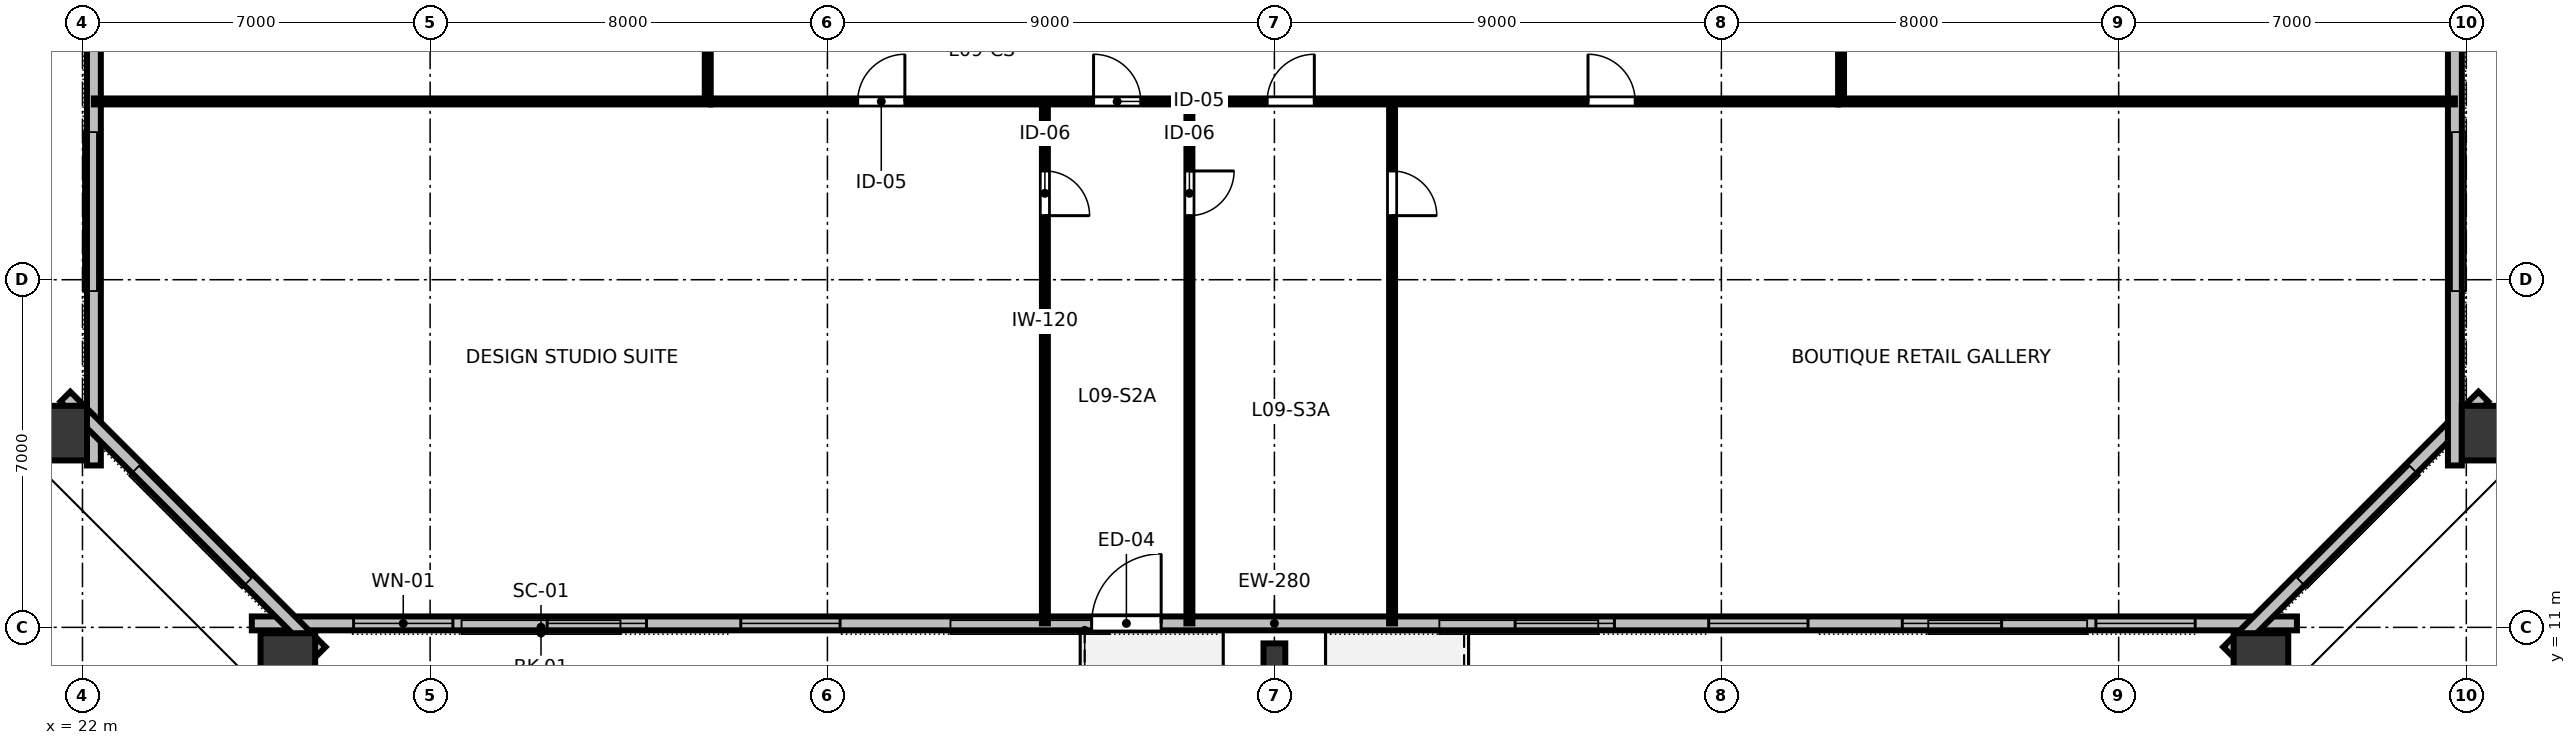
"""IFC4 building model, lengths in metres.
Left out: names, types, materials, properties, quantities, classifications, styles, units other than length and angle.
Written with IfcOpenShell. Run it as: python <this file> out.ifc"""

import sys

from ifc_helpers import new_model, si_unit, direction, frame, frame_2d, origin, origin_2d, place, context, subcontext, project, spatial, rectangle, hollow_rectangle, i_section, extrude, element, fill, save


model = new_model("IFC4")
c1 = context("Model", 3, precision=1e-05, world=origin(), true_north=direction((0.0, 1.0)))
c2 = subcontext(c1, "Body", "Model", "MODEL_VIEW")
j1 = project(units=[si_unit("LENGTHUNIT", "METRE"), si_unit("PLANEANGLEUNIT", "RADIAN")], contexts=[c1])
p1 = place(None, origin())
s1 = spatial("IfcSite", under=j1, at=p1, CompositionType="ELEMENT")
p2 = place(p1, origin())
s2 = spatial("IfcBuilding", under=s1, at=p2, CompositionType="ELEMENT")
p3 = place(p2, frame((0.0, 0.0, 38.8)))
s3 = spatial("IfcBuildingStorey", under=s2, at=p3, CompositionType="ELEMENT", Elevation=38.8)
p4 = place(p3, frame((26.135, 10.232, 0.0), z_axis=(0.0, 0.0, 1.0), x_axis=(1.0, 0.0, 0.0)))
e1 = element("IfcColumn", 1, at=p4, inside=s3, PredefinedType="COLUMN", context=c2, shape_type="SweptSolid", body=[
    extrude(hollow_rectangle(XDim=1.1, YDim=1.3, WallThickness=0.07, at=origin_2d()), origin(), (0.0, 0.0, 1.0), 3.358),
])
p5 = place(p3, frame((46.0, 10.42, 0.0), z_axis=(0.0, 0.0, 1.0), x_axis=(1.0, 0.0, 0.0)))
e2 = element("IfcColumn", 2, at=p5, inside=s3, PredefinedType="COLUMN", context=c2, shape_type="SweptSolid", body=[
    extrude(i_section(OverallWidth=0.439, OverallDepth=0.514, WebThickness=0.06, FlangeThickness=0.097, FilletRadius=0.025, at=origin_2d()), origin(), (0.0, 0.0, 1.0), 3.358),
])
for number, where, z_axis, x_axis in (
    (3, (65.865, 10.232, 0.0), (0.0, 0.0, 1.0), (1.0, 0.0, 0.0)),
    (4, (70.559, 14.911, 0.0), (0.0, 0.0, 1.0), (0.0, 1.0, 0.0)),
    (5, (21.441, 14.911, 0.0), (0.0, 0.0, 1.0), (0.0, 1.0, 0.0)),
):
    element("IfcColumn", number, at=place(p3, frame(where, z_axis=z_axis, x_axis=x_axis)), inside=s3, PredefinedType="COLUMN", context=c2, shape_type="SweptSolid", body=[
        extrude(hollow_rectangle(XDim=1.1, YDim=1.3, WallThickness=0.07, at=origin_2d()), origin(), (0.0, 0.0, 1.0), 3.358),
    ])
p6 = place(p3, frame((25.41, 11.08, 0.0), z_axis=(0.0, 0.0, 1.0), x_axis=(1.0, 0.0, 0.0)))
e6 = element("IfcWall", 6, at=p6, inside=s3, PredefinedType="STANDARD", context=c2, shape_type="SweptSolid", body=[
    extrude(rectangle(XDim=41.18, YDim=0.28, at=frame_2d((20.59, 0.0))), origin(), (0.0, 0.0, 1.0), 3.36),
])
p7 = place(p6, frame((16.91, 0.0, 0.0)))
e7 = element("IfcOpeningElement", 7, at=p7, cuts=e6, PredefinedType="OPENING", context=c2, shape_type="SweptSolid", body=[
    extrude(rectangle(XDim=1.4, YDim=2.15, at=frame_2d((0.7, 1.075))), frame((0.0, 0.15, 0.0), z_axis=(0.0, -1.0, 0.0), x_axis=(1.0, 0.0, 0.0)), (0.0, 0.0, 1.0), 0.3),
])
p8 = place(p6, frame((2.049, 0.0, 0.8)))
e8 = element("IfcOpeningElement", 8, at=p8, cuts=e6, PredefinedType="OPENING", context=c2, shape_type="SweptSolid", body=[
    extrude(rectangle(XDim=2.0, YDim=1.95, at=frame_2d((1.0, 0.975))), frame((0.0, 0.15, 0.0), z_axis=(0.0, -1.0, 0.0), x_axis=(1.0, 0.0, 0.0)), (0.0, 0.0, 1.0), 0.3),
])
p9 = place(p6, frame((5.947, 0.0, 0.8)))
e9 = element("IfcOpeningElement", 9, at=p9, cuts=e6, PredefinedType="OPENING", context=c2, shape_type="SweptSolid", body=[
    extrude(rectangle(XDim=2.0, YDim=1.95, at=frame_2d((1.0, 0.975))), frame((0.0, 0.15, 0.0), z_axis=(0.0, -1.0, 0.0), x_axis=(1.0, 0.0, 0.0)), (0.0, 0.0, 1.0), 0.3),
])
p10 = place(p6, frame((9.845, 0.0, 0.8)))
e10 = element("IfcOpeningElement", 10, at=p10, cuts=e6, PredefinedType="OPENING", context=c2, shape_type="SweptSolid", body=[
    extrude(rectangle(XDim=2.0, YDim=1.95, at=frame_2d((1.0, 0.975))), frame((0.0, 0.15, 0.0), z_axis=(0.0, -1.0, 0.0), x_axis=(1.0, 0.0, 0.0)), (0.0, 0.0, 1.0), 0.3),
])
p11 = place(p6, frame((25.437, 0.0, 0.8)))
e11 = element("IfcOpeningElement", 11, at=p11, cuts=e6, PredefinedType="OPENING", context=c2, shape_type="SweptSolid", body=[
    extrude(rectangle(XDim=2.0, YDim=1.95, at=frame_2d((1.0, 0.975))), frame((0.0, 0.15, 0.0), z_axis=(0.0, -1.0, 0.0), x_axis=(1.0, 0.0, 0.0)), (0.0, 0.0, 1.0), 0.3),
])
p12 = place(p6, frame((29.335, 0.0, 0.8)))
e12 = element("IfcOpeningElement", 12, at=p12, cuts=e6, PredefinedType="OPENING", context=c2, shape_type="SweptSolid", body=[
    extrude(rectangle(XDim=2.0, YDim=1.95, at=frame_2d((1.0, 0.975))), frame((0.0, 0.15, 0.0), z_axis=(0.0, -1.0, 0.0), x_axis=(1.0, 0.0, 0.0)), (0.0, 0.0, 1.0), 0.3),
])
p13 = place(p6, frame((33.233, 0.0, 0.8)))
e13 = element("IfcOpeningElement", 13, at=p13, cuts=e6, PredefinedType="OPENING", context=c2, shape_type="SweptSolid", body=[
    extrude(rectangle(XDim=2.0, YDim=1.95, at=frame_2d((1.0, 0.975))), frame((0.0, 0.15, 0.0), z_axis=(0.0, -1.0, 0.0), x_axis=(1.0, 0.0, 0.0)), (0.0, 0.0, 1.0), 0.3),
])
p14 = place(p6, frame((37.131, 0.0, 0.8)))
e14 = element("IfcOpeningElement", 14, at=p14, cuts=e6, PredefinedType="OPENING", context=c2, shape_type="SweptSolid", body=[
    extrude(rectangle(XDim=2.0, YDim=1.95, at=frame_2d((1.0, 0.975))), frame((0.0, 0.15, 0.0), z_axis=(0.0, -1.0, 0.0), x_axis=(1.0, 0.0, 0.0)), (0.0, 0.0, 1.0), 0.3),
])
p15 = place(p3, frame((65.205, 10.506, 0.0), z_axis=(0.0, 0.0, 1.0), x_axis=(0.707106781187, 0.707106781187, 0.0)))
e15 = element("IfcWall", 15, at=p15, inside=s3, PredefinedType="STANDARD", context=c2, shape_type="SweptSolid", body=[
    extrude(rectangle(XDim=7.268, YDim=0.28, at=frame_2d((3.634, 0.0))), origin(), (0.0, 0.0, 1.0), 3.36),
])
for number, where, z_axis, x_axis in (
    (16, (69.77, 14.26, 0.0), (0.0, 0.0, 1.0), (0.0, 1.0, 0.0)),
    (17, (22.23, 49.74, 0.0), (0.0, 0.0, 1.0), (0.0, -1.0, 0.0)),
):
    element("IfcWall", number, at=place(p3, frame(where, z_axis=z_axis, x_axis=x_axis)), inside=s3, PredefinedType="STANDARD", context=c2, shape_type="SweptSolid", body=[
        extrude(rectangle(XDim=35.48, YDim=0.28, at=frame_2d((17.74, 0.0))), origin(), (0.0, 0.0, 1.0), 3.36),
    ])
p16 = place(p3, frame((21.656, 15.646, 0.0), z_axis=(0.0, 0.0, 1.0), x_axis=(0.707106781187, -0.707106781187, 0.0)))
e18 = element("IfcWall", 18, at=p16, inside=s3, PredefinedType="STANDARD", context=c2, shape_type="SweptSolid", body=[
    extrude(rectangle(XDim=7.268, YDim=0.28, at=frame_2d((3.634, 0.0))), origin(), (0.0, 0.0, 1.0), 3.36),
])
p17 = place(p3, frame((41.379, 21.59, 0.0), z_axis=(0.0, 0.0, 1.0), x_axis=(0.0, -1.0, 0.0)))
e19 = element("IfcWall", 19, at=p17, inside=s3, PredefinedType="PARTITIONING", context=c2, shape_type="SweptSolid", body=[
    extrude(rectangle(XDim=10.51, YDim=0.12, at=frame_2d((5.255, 0.0))), origin(), (0.0, 0.0, 1.0), 2.64),
])
p18 = place(p17, frame((1.4, 0.0, 0.0)))
e20 = element("IfcOpeningElement", 20, at=p18, cuts=e19, PredefinedType="OPENING", context=c2, shape_type="SweptSolid", body=[
    extrude(rectangle(XDim=0.9, YDim=2.15, at=frame_2d((0.45, 1.075))), frame((0.0, 0.07, 0.0), z_axis=(0.0, -1.0, 0.0), x_axis=(1.0, 0.0, 0.0)), (0.0, 0.0, 1.0), 0.14),
])
p19 = place(p3, frame((44.289, 21.59, 0.0), z_axis=(0.0, 0.0, 1.0), x_axis=(0.0, -1.0, 0.0)))
e21 = element("IfcWall", 21, at=p19, inside=s3, PredefinedType="PARTITIONING", context=c2, shape_type="SweptSolid", body=[
    extrude(rectangle(XDim=10.51, YDim=0.12, at=frame_2d((5.255, 0.0))), origin(), (0.0, 0.0, 1.0), 2.64),
])
p20 = place(p19, frame((1.4, 0.0, 0.0)))
e22 = element("IfcOpeningElement", 22, at=p20, cuts=e21, PredefinedType="OPENING", context=c2, shape_type="SweptSolid", body=[
    extrude(rectangle(XDim=0.9, YDim=2.15, at=frame_2d((0.45, 1.075))), frame((0.0, 0.07, 0.0), z_axis=(0.0, -1.0, 0.0), x_axis=(1.0, 0.0, 0.0)), (0.0, 0.0, 1.0), 0.14),
])
p21 = place(p3, frame((48.37, 21.59, 0.0), z_axis=(0.0, 0.0, 1.0), x_axis=(0.0, -1.0, 0.0)))
e23 = element("IfcWall", 23, at=p21, inside=s3, PredefinedType="PARTITIONING", context=c2, shape_type="SweptSolid", body=[
    extrude(rectangle(XDim=10.51, YDim=0.12, at=frame_2d((5.255, 0.0))), origin(), (0.0, 0.0, 1.0), 2.64),
])
p22 = place(p21, frame((1.4, 0.0, 0.0)))
e24 = element("IfcOpeningElement", 24, at=p22, cuts=e23, PredefinedType="OPENING", context=c2, shape_type="SweptSolid", body=[
    extrude(rectangle(XDim=0.9, YDim=2.15, at=frame_2d((0.45, 1.075))), frame((0.0, 0.07, 0.0), z_axis=(0.0, -1.0, 0.0), x_axis=(1.0, 0.0, 0.0)), (0.0, 0.0, 1.0), 0.14),
])
p23 = place(p3, frame((34.65, 21.59, 0.0), z_axis=(0.0, 0.0, 1.0), x_axis=(1.0, 0.0, 0.0)))
e25 = element("IfcWall", 25, at=p23, inside=s3, PredefinedType="PARTITIONING", context=c2, shape_type="SweptSolid", body=[
    extrude(rectangle(XDim=22.7, YDim=0.12, at=frame_2d((11.35, 0.0))), origin(), (0.0, 0.0, 1.0), 2.64),
])
p24 = place(p23, frame((2.959, 0.0, 0.0)))
e26 = element("IfcOpeningElement", 26, at=p24, cuts=e25, PredefinedType="OPENING", context=c2, shape_type="SweptSolid", body=[
    extrude(rectangle(XDim=0.95, YDim=2.15, at=frame_2d((0.475, 1.075))), frame((0.0, 0.07, 0.0), z_axis=(0.0, -1.0, 0.0), x_axis=(1.0, 0.0, 0.0)), (0.0, 0.0, 1.0), 0.14),
])
p25 = place(p23, frame((7.709, 0.0, 0.0)))
e27 = element("IfcOpeningElement", 27, at=p25, cuts=e25, PredefinedType="OPENING", context=c2, shape_type="SweptSolid", body=[
    extrude(rectangle(XDim=0.95, YDim=2.15, at=frame_2d((0.475, 1.075))), frame((0.0, 0.07, 0.0), z_axis=(0.0, -1.0, 0.0), x_axis=(1.0, 0.0, 0.0)), (0.0, 0.0, 1.0), 0.14),
])
p26 = place(p23, frame((11.204, 0.0, 0.0)))
e28 = element("IfcOpeningElement", 28, at=p26, cuts=e25, PredefinedType="OPENING", context=c2, shape_type="SweptSolid", body=[
    extrude(rectangle(XDim=0.95, YDim=2.15, at=frame_2d((0.475, 1.075))), frame((0.0, 0.07, 0.0), z_axis=(0.0, -1.0, 0.0), x_axis=(1.0, 0.0, 0.0)), (0.0, 0.0, 1.0), 0.14),
])
p27 = place(p23, frame((17.665, 0.0, 0.0)))
e29 = element("IfcOpeningElement", 29, at=p27, cuts=e25, PredefinedType="OPENING", context=c2, shape_type="SweptSolid", body=[
    extrude(rectangle(XDim=0.95, YDim=2.15, at=frame_2d((0.475, 1.075))), frame((0.0, 0.07, 0.0), z_axis=(0.0, -1.0, 0.0), x_axis=(1.0, 0.0, 0.0)), (0.0, 0.0, 1.0), 0.14),
])
p28 = place(p3, frame((34.59, 21.65, 0.0), z_axis=(0.0, 0.0, 1.0), x_axis=(0.0, 1.0, 0.0)))
e30 = element("IfcWall", 30, at=p28, inside=s3, PredefinedType="PARTITIONING", context=c2, shape_type="SweptSolid", body=[
    extrude(rectangle(XDim=20.7, YDim=0.12, at=frame_2d((10.35, 0.0))), origin(), (0.0, 0.0, 1.0), 2.64),
])
p29 = place(p28, frame((3.402, 0.0, 0.0)))
e31 = element("IfcOpeningElement", 31, at=p29, cuts=e30, PredefinedType="OPENING", context=c2, shape_type="SweptSolid", body=[
    extrude(rectangle(XDim=0.95, YDim=2.15, at=frame_2d((0.475, 1.075))), frame((0.0, 0.07, 0.0), z_axis=(0.0, -1.0, 0.0), x_axis=(1.0, 0.0, 0.0)), (0.0, 0.0, 1.0), 0.14),
])
p30 = place(p28, frame((9.912, 0.0, 0.0)))
e32 = element("IfcOpeningElement", 32, at=p30, cuts=e30, PredefinedType="OPENING", context=c2, shape_type="SweptSolid", body=[
    extrude(rectangle(XDim=0.95, YDim=2.15, at=frame_2d((0.475, 1.075))), frame((0.0, 0.07, 0.0), z_axis=(0.0, -1.0, 0.0), x_axis=(1.0, 0.0, 0.0)), (0.0, 0.0, 1.0), 0.14),
])
p31 = place(p28, frame((16.385, 0.0, 0.0)))
e33 = element("IfcOpeningElement", 33, at=p31, cuts=e30, PredefinedType="OPENING", context=c2, shape_type="SweptSolid", body=[
    extrude(rectangle(XDim=0.95, YDim=2.15, at=frame_2d((0.475, 1.075))), frame((0.0, 0.07, 0.0), z_axis=(0.0, -1.0, 0.0), x_axis=(1.0, 0.0, 0.0)), (0.0, 0.0, 1.0), 0.14),
])
p32 = place(p3, frame((57.41, 21.65, 0.0), z_axis=(0.0, 0.0, 1.0), x_axis=(0.0, 1.0, 0.0)))
e34 = element("IfcWall", 34, at=p32, inside=s3, PredefinedType="PARTITIONING", context=c2, shape_type="SweptSolid", body=[
    extrude(rectangle(XDim=20.7, YDim=0.12, at=frame_2d((10.35, 0.0))), origin(), (0.0, 0.0, 1.0), 2.64),
])
p33 = place(p32, frame((9.875, 0.0, 0.0)))
e35 = element("IfcOpeningElement", 35, at=p33, cuts=e34, PredefinedType="OPENING", context=c2, shape_type="SweptSolid", body=[
    extrude(rectangle(XDim=0.95, YDim=2.15, at=frame_2d((0.475, 1.075))), frame((0.0, 0.07, 0.0), z_axis=(0.0, -1.0, 0.0), x_axis=(1.0, 0.0, 0.0)), (0.0, 0.0, 1.0), 0.14),
])
for number, where, z_axis, x_axis in (
    (36, (34.65, 21.59, 0.0), (0.0, 0.0, 1.0), (-1.0, 0.0, 0.0)),
    (37, (57.35, 21.59, 0.0), (0.0, 0.0, 1.0), (1.0, 0.0, 0.0)),
):
    element("IfcWall", number, at=place(p3, frame(where, z_axis=z_axis, x_axis=x_axis)), inside=s3, PredefinedType="PARTITIONING", context=c2, shape_type="SweptSolid", body=[
        extrude(rectangle(XDim=12.42, YDim=0.12, at=frame_2d((6.21, 0.0))), origin(), (0.0, 0.0, 1.0), 2.64),
    ])
p34 = place(p7, origin())
e38 = element("IfcDoor", 38, at=p34, inside=s3, OperationType="SINGLE_SWING_RIGHT", PredefinedType="DOOR", context=c2, shape_type="SweptSolid", body=[
    extrude(rectangle(XDim=1.4, YDim=2.15, at=frame_2d((0.7, 1.075))), frame((0.0, 0.025, 0.0), z_axis=(0.0, -1.0, 0.0), x_axis=(1.0, 0.0, 0.0)), (0.0, 0.0, 1.0), 0.05),
])
fill(e7, e38)
p35 = place(p8, origin())
e39 = element("IfcWindow", 39, at=p35, inside=s3, PartitioningType="SINGLE_PANEL", PredefinedType="WINDOW", context=c2, shape_type="SweptSolid", body=[
    extrude(rectangle(XDim=2.0, YDim=1.95, at=frame_2d((1.0, 0.975))), frame((0.0, 0.03, 0.0), z_axis=(0.0, -1.0, 0.0), x_axis=(1.0, 0.0, 0.0)), (0.0, 0.0, 1.0), 0.06),
])
fill(e8, e39)
p36 = place(p9, origin())
e40 = element("IfcWindow", 40, at=p36, inside=s3, PartitioningType="SINGLE_PANEL", PredefinedType="WINDOW", context=c2, shape_type="SweptSolid", body=[
    extrude(rectangle(XDim=2.0, YDim=1.95, at=frame_2d((1.0, 0.975))), frame((0.0, 0.03, 0.0), z_axis=(0.0, -1.0, 0.0), x_axis=(1.0, 0.0, 0.0)), (0.0, 0.0, 1.0), 0.06),
])
fill(e9, e40)
p37 = place(p10, origin())
e41 = element("IfcWindow", 41, at=p37, inside=s3, PartitioningType="SINGLE_PANEL", PredefinedType="WINDOW", context=c2, shape_type="SweptSolid", body=[
    extrude(rectangle(XDim=2.0, YDim=1.95, at=frame_2d((1.0, 0.975))), frame((0.0, 0.03, 0.0), z_axis=(0.0, -1.0, 0.0), x_axis=(1.0, 0.0, 0.0)), (0.0, 0.0, 1.0), 0.06),
])
fill(e10, e41)
p38 = place(p11, origin())
e42 = element("IfcWindow", 42, at=p38, inside=s3, PartitioningType="SINGLE_PANEL", PredefinedType="WINDOW", context=c2, shape_type="SweptSolid", body=[
    extrude(rectangle(XDim=2.0, YDim=1.95, at=frame_2d((1.0, 0.975))), frame((0.0, 0.03, 0.0), z_axis=(0.0, -1.0, 0.0), x_axis=(1.0, 0.0, 0.0)), (0.0, 0.0, 1.0), 0.06),
])
fill(e11, e42)
p39 = place(p12, origin())
e43 = element("IfcWindow", 43, at=p39, inside=s3, PartitioningType="SINGLE_PANEL", PredefinedType="WINDOW", context=c2, shape_type="SweptSolid", body=[
    extrude(rectangle(XDim=2.0, YDim=1.95, at=frame_2d((1.0, 0.975))), frame((0.0, 0.03, 0.0), z_axis=(0.0, -1.0, 0.0), x_axis=(1.0, 0.0, 0.0)), (0.0, 0.0, 1.0), 0.06),
])
fill(e12, e43)
p40 = place(p13, origin())
e44 = element("IfcWindow", 44, at=p40, inside=s3, PartitioningType="SINGLE_PANEL", PredefinedType="WINDOW", context=c2, shape_type="SweptSolid", body=[
    extrude(rectangle(XDim=2.0, YDim=1.95, at=frame_2d((1.0, 0.975))), frame((0.0, 0.03, 0.0), z_axis=(0.0, -1.0, 0.0), x_axis=(1.0, 0.0, 0.0)), (0.0, 0.0, 1.0), 0.06),
])
fill(e13, e44)
p41 = place(p14, origin())
e45 = element("IfcWindow", 45, at=p41, inside=s3, PartitioningType="SINGLE_PANEL", PredefinedType="WINDOW", context=c2, shape_type="SweptSolid", body=[
    extrude(rectangle(XDim=2.0, YDim=1.95, at=frame_2d((1.0, 0.975))), frame((0.0, 0.03, 0.0), z_axis=(0.0, -1.0, 0.0), x_axis=(1.0, 0.0, 0.0)), (0.0, 0.0, 1.0), 0.06),
])
fill(e14, e45)
p42 = place(p18, origin())
e46 = element("IfcDoor", 46, at=p42, inside=s3, OperationType="SINGLE_SWING_RIGHT", PredefinedType="DOOR", context=c2, shape_type="SweptSolid", body=[
    extrude(rectangle(XDim=0.9, YDim=2.15, at=frame_2d((0.45, 1.075))), frame((0.0, 0.025, 0.0), z_axis=(0.0, -1.0, 0.0), x_axis=(1.0, 0.0, 0.0)), (0.0, 0.0, 1.0), 0.05),
])
fill(e20, e46)
p43 = place(p20, origin())
e47 = element("IfcDoor", 47, at=p43, inside=s3, OperationType="SINGLE_SWING_LEFT", PredefinedType="DOOR", context=c2, shape_type="SweptSolid", body=[
    extrude(rectangle(XDim=0.9, YDim=2.15, at=frame_2d((0.45, 1.075))), frame((0.0, 0.025, 0.0), z_axis=(0.0, -1.0, 0.0), x_axis=(1.0, 0.0, 0.0)), (0.0, 0.0, 1.0), 0.05),
])
fill(e22, e47)
p44 = place(p22, origin())
e48 = element("IfcDoor", 48, at=p44, inside=s3, OperationType="SINGLE_SWING_RIGHT", PredefinedType="DOOR", context=c2, shape_type="SweptSolid", body=[
    extrude(rectangle(XDim=0.9, YDim=2.15, at=frame_2d((0.45, 1.075))), frame((0.0, 0.025, 0.0), z_axis=(0.0, -1.0, 0.0), x_axis=(1.0, 0.0, 0.0)), (0.0, 0.0, 1.0), 0.05),
])
fill(e24, e48)
p45 = place(p24, origin())
e49 = element("IfcDoor", 49, at=p45, inside=s3, OperationType="SINGLE_SWING_RIGHT", PredefinedType="DOOR", context=c2, shape_type="SweptSolid", body=[
    extrude(rectangle(XDim=0.95, YDim=2.15, at=frame_2d((0.475, 1.075))), frame((0.0, 0.025, 0.0), z_axis=(0.0, -1.0, 0.0), x_axis=(1.0, 0.0, 0.0)), (0.0, 0.0, 1.0), 0.05),
])
fill(e26, e49)
p46 = place(p25, origin())
e50 = element("IfcDoor", 50, at=p46, inside=s3, OperationType="SINGLE_SWING_LEFT", PredefinedType="DOOR", context=c2, shape_type="SweptSolid", body=[
    extrude(rectangle(XDim=0.95, YDim=2.15, at=frame_2d((0.475, 1.075))), frame((0.0, 0.025, 0.0), z_axis=(0.0, -1.0, 0.0), x_axis=(1.0, 0.0, 0.0)), (0.0, 0.0, 1.0), 0.05),
])
fill(e27, e50)
p47 = place(p26, origin())
e51 = element("IfcDoor", 51, at=p47, inside=s3, OperationType="SINGLE_SWING_RIGHT", PredefinedType="DOOR", context=c2, shape_type="SweptSolid", body=[
    extrude(rectangle(XDim=0.95, YDim=2.15, at=frame_2d((0.475, 1.075))), frame((0.0, 0.025, 0.0), z_axis=(0.0, -1.0, 0.0), x_axis=(1.0, 0.0, 0.0)), (0.0, 0.0, 1.0), 0.05),
])
fill(e28, e51)
p48 = place(p27, origin())
e52 = element("IfcDoor", 52, at=p48, inside=s3, OperationType="SINGLE_SWING_LEFT", PredefinedType="DOOR", context=c2, shape_type="SweptSolid", body=[
    extrude(rectangle(XDim=0.95, YDim=2.15, at=frame_2d((0.475, 1.075))), frame((0.0, 0.025, 0.0), z_axis=(0.0, -1.0, 0.0), x_axis=(1.0, 0.0, 0.0)), (0.0, 0.0, 1.0), 0.05),
])
fill(e29, e52)
save(model, sys.argv[1])
